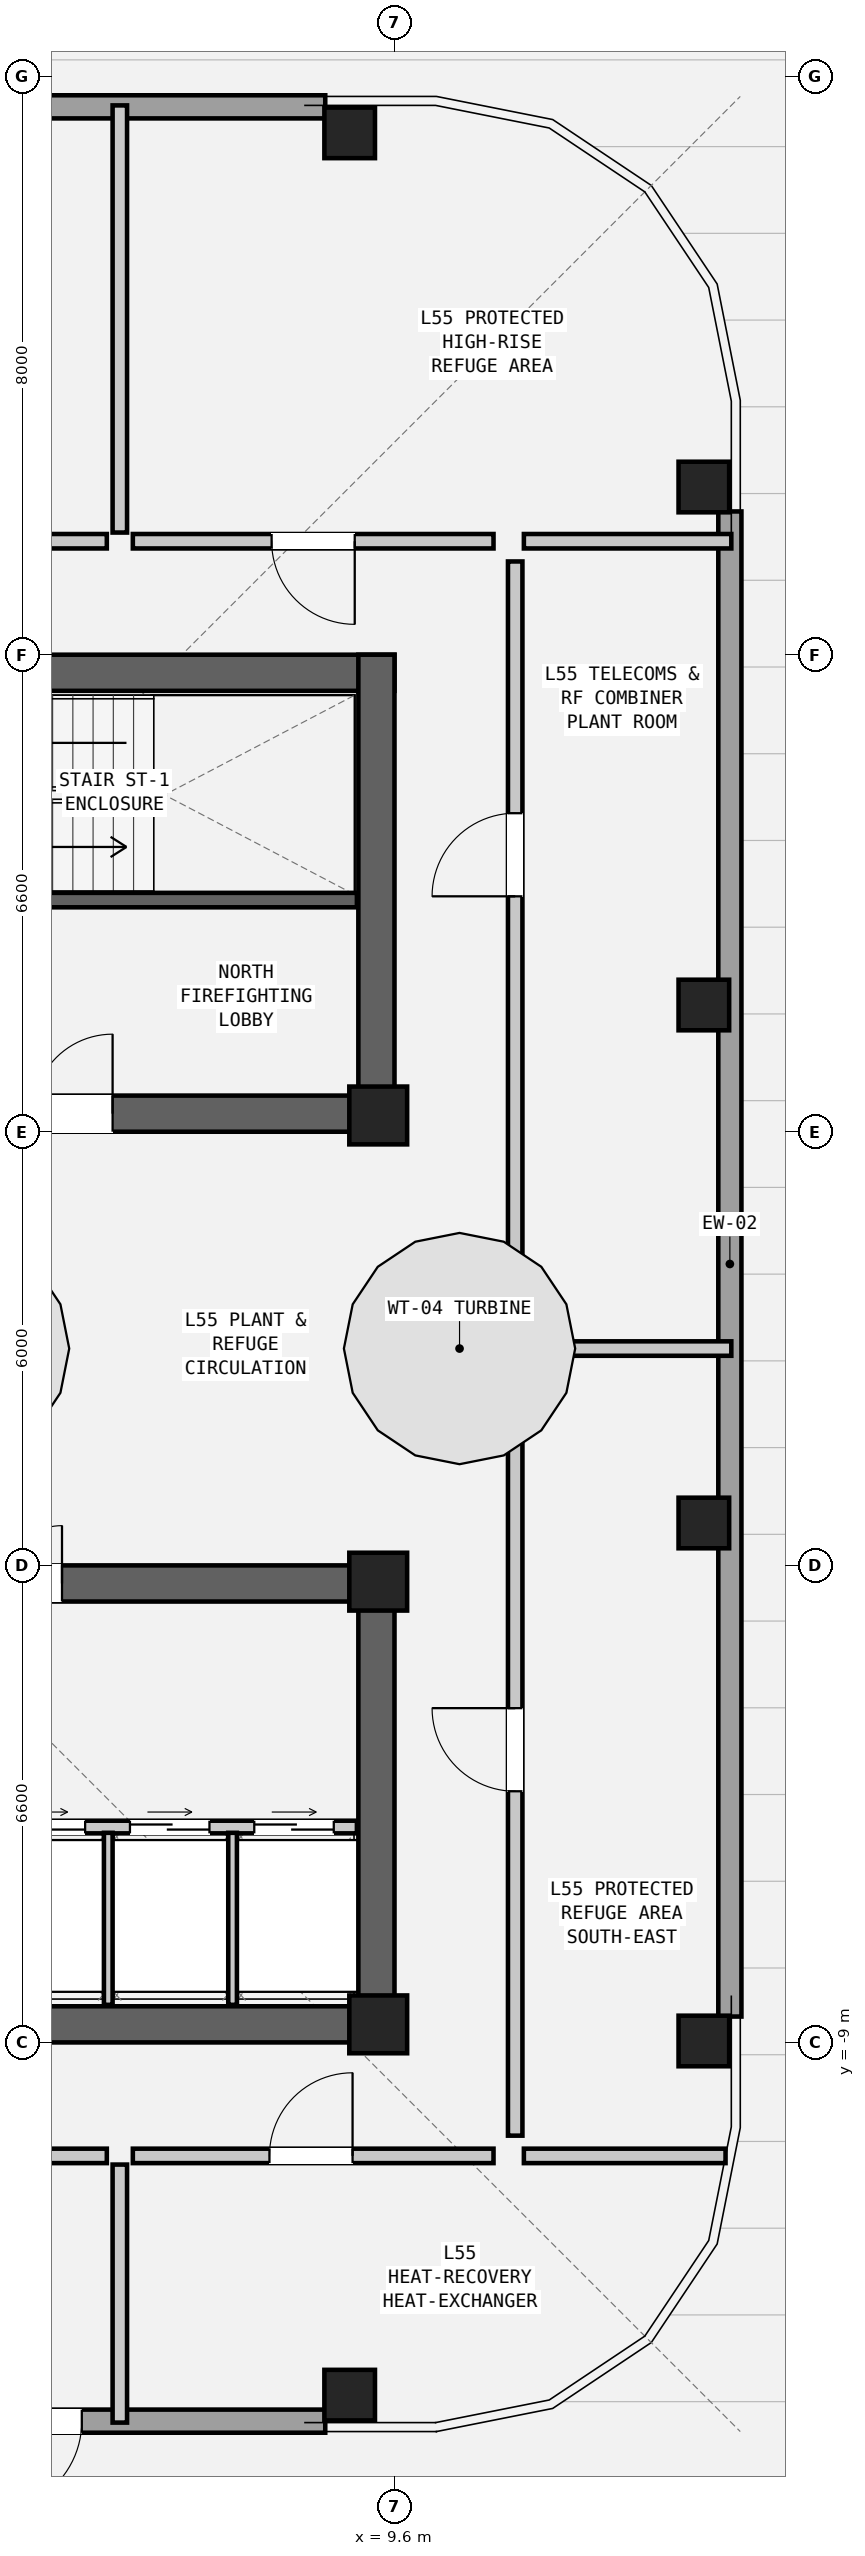
"""IFC4 building model, lengths in metres.
Left out: names, types, materials, properties, quantities, classifications, styles, units other than length and angle.
Written with IfcOpenShell. Run it as: python <this file> out.ifc"""

import sys

from ifc_helpers import new_model, si_unit, direction, frame, frame_2d, origin, origin_2d, place, context, subcontext, project, spatial, rectangle, hollow_rectangle, extrude, element, fill, save


model = new_model("IFC4")
c1 = context("Model", 3, precision=1e-05, world=origin(), true_north=direction((0.0, 1.0)))
c2 = subcontext(c1, "Body", "Model", "MODEL_VIEW")
j1 = project(units=[si_unit("LENGTHUNIT", "METRE"), si_unit("PLANEANGLEUNIT", "RADIAN")], contexts=[c1])
p1 = place(None, origin())
s1 = spatial("IfcSite", under=j1, at=p1, CompositionType="ELEMENT")
p2 = place(p1, origin())
s2 = spatial("IfcBuilding", under=s1, at=p2, CompositionType="ELEMENT")
p3 = place(p2, frame((0.0, 0.0, 187.95)))
s3 = spatial("IfcBuildingStorey", under=s2, at=p3, CompositionType="ELEMENT", Elevation=187.95)
p4 = place(p3, frame((-9.6, 9.95, 0.0), z_axis=(0.0, 0.0, 1.0), x_axis=(1.0, 0.0, 0.0)))
e1 = element("IfcWall", 1, at=p4, inside=s3, PredefinedType="SHEAR", context=c2, shape_type="SweptSolid", body=[
    extrude(rectangle(XDim=19.2, YDim=0.5, at=frame_2d((9.6, 0.0))), origin(), (0.0, 0.0, 1.0), 3.6),
])
p5 = place(p3, frame((-9.6, 3.85, 0.0), z_axis=(0.0, 0.0, 1.0), x_axis=(1.0, 0.0, 0.0)))
e2 = element("IfcWall", 2, at=p5, inside=s3, PredefinedType="SHEAR", context=c2, shape_type="SweptSolid", body=[
    extrude(rectangle(XDim=19.2, YDim=0.5, at=frame_2d((9.6, 0.0))), origin(), (0.0, 0.0, 1.0), 3.6),
])
p6 = place(p5, frame((14.2, 0.0, 0.0)))
e3 = element("IfcOpeningElement", 3, at=p6, cuts=e2, PredefinedType="OPENING", context=c2, shape_type="SweptSolid", body=[
    extrude(rectangle(XDim=1.1, YDim=2.08, at=frame_2d((0.55, 1.04))), frame((0.0, 0.262, 0.0), z_axis=(0.0, -1.0, 0.0), x_axis=(1.0, 0.0, 0.0)), (0.0, 0.0, 1.0), 0.524),
])
p7 = place(p5, frame((8.2, 0.0, 0.0)))
e4 = element("IfcOpeningElement", 4, at=p7, cuts=e2, PredefinedType="OPENING", context=c2, shape_type="SweptSolid", body=[
    extrude(rectangle(XDim=1.15, YDim=2.1, at=frame_2d((0.575, 1.05))), frame((0.0, 0.262, 0.0), z_axis=(0.0, -1.0, 0.0), x_axis=(1.0, 0.0, 0.0)), (0.0, 0.0, 1.0), 0.524),
])
p8 = place(p5, frame((2.5, 0.0, 0.0)))
e5 = element("IfcOpeningElement", 5, at=p8, cuts=e2, PredefinedType="OPENING", context=c2, shape_type="SweptSolid", body=[
    extrude(rectangle(XDim=1.2, YDim=2.1, at=frame_2d((0.6, 1.05))), frame((0.0, 0.262, 0.0), z_axis=(0.0, -1.0, 0.0), x_axis=(1.0, 0.0, 0.0)), (0.0, 0.0, 1.0), 0.524),
])
p9 = place(p3, frame((9.35, 3.6, 0.0), z_axis=(0.0, 0.0, 1.0), x_axis=(0.0, 1.0, 0.0)))
e6 = element("IfcWall", 6, at=p9, inside=s3, PredefinedType="SHEAR", context=c2, shape_type="SweptSolid", body=[
    extrude(rectangle(XDim=6.6, YDim=0.5, at=frame_2d((3.3, 0.0))), origin(), (0.0, 0.0, 1.0), 3.6),
])
p10 = place(p3, frame((-9.6, -8.75, 0.0), z_axis=(0.0, 0.0, 1.0), x_axis=(1.0, 0.0, 0.0)))
e7 = element("IfcWall", 7, at=p10, inside=s3, PredefinedType="SHEAR", context=c2, shape_type="SweptSolid", body=[
    extrude(rectangle(XDim=19.2, YDim=0.5, at=frame_2d((9.6, 0.0))), origin(), (0.0, 0.0, 1.0), 3.6),
])
p11 = place(p3, frame((-9.6, -2.65, 0.0), z_axis=(0.0, 0.0, 1.0), x_axis=(1.0, 0.0, 0.0)))
e8 = element("IfcWall", 8, at=p11, inside=s3, PredefinedType="SHEAR", context=c2, shape_type="SweptSolid", body=[
    extrude(rectangle(XDim=19.2, YDim=0.5, at=frame_2d((9.6, 0.0))), origin(), (0.0, 0.0, 1.0), 3.6),
])
p12 = place(p11, frame((3.8, 0.0, 0.0)))
e9 = element("IfcOpeningElement", 9, at=p12, cuts=e8, PredefinedType="OPENING", context=c2, shape_type="SweptSolid", body=[
    extrude(rectangle(XDim=1.1, YDim=2.08, at=frame_2d((0.55, 1.04))), frame((0.0, 0.262, 0.0), z_axis=(0.0, -1.0, 0.0), x_axis=(1.0, 0.0, 0.0)), (0.0, 0.0, 1.0), 0.524),
])
p13 = place(p11, frame((13.0, 0.0, 0.0)))
e10 = element("IfcOpeningElement", 10, at=p13, cuts=e8, PredefinedType="OPENING", context=c2, shape_type="SweptSolid", body=[
    extrude(rectangle(XDim=1.6, YDim=2.12, at=frame_2d((0.8, 1.06))), frame((0.0, 0.262, 0.0), z_axis=(0.0, -1.0, 0.0), x_axis=(1.0, 0.0, 0.0)), (0.0, 0.0, 1.0), 0.524),
])
p14 = place(p3, frame((9.35, -9.0, 0.0), z_axis=(0.0, 0.0, 1.0), x_axis=(0.0, 1.0, 0.0)))
e11 = element("IfcWall", 11, at=p14, inside=s3, PredefinedType="SHEAR", context=c2, shape_type="SweptSolid", body=[
    extrude(rectangle(XDim=6.6, YDim=0.5, at=frame_2d((3.3, 0.0))), origin(), (0.0, 0.0, 1.0), 3.6),
])
for number, where, z_axis, x_axis in (
    (12, (8.98, -13.88, 0.0), (0.0, 0.0, 1.0), (1.0, 0.0, 0.0)),
    (13, (13.88, -8.98, 0.0), (0.0, 0.0, 1.0), (0.0, 1.0, 0.0)),
    (14, (13.88, -1.813, 0.0), (0.0, 0.0, 1.0), (0.0, 1.0, 0.0)),
    (15, (13.88, 5.353, 0.0), (0.0, 0.0, 1.0), (0.0, 1.0, 0.0)),
    (16, (13.88, 12.52, 0.0), (0.0, 0.0, 1.0), (0.0, 1.0, 0.0)),
    (17, (8.98, 17.42, 0.0), (0.0, 0.0, 1.0), (1.0, 0.0, 0.0)),
):
    element("IfcColumn", number, at=place(p3, frame(where, z_axis=z_axis, x_axis=x_axis)), inside=s3, PredefinedType="COLUMN", context=c2, shape_type="SweptSolid", body=[
        extrude(hollow_rectangle(XDim=0.7, YDim=0.7, WallThickness=0.045, at=origin_2d()), origin(), (0.0, 0.0, 1.0), 3.6),
    ])
for number, where, z_axis, x_axis in (
    (18, (9.375, 3.825, 0.0), (0.0, 0.0, 1.0), (1.0, 0.0, 0.0)),
    (19, (9.375, -2.625, 0.0), (0.0, 0.0, 1.0), (1.0, 0.0, 0.0)),
    (20, (9.375, -8.75, 0.0), (0.0, 0.0, 1.0), (1.0, 0.0, 0.0)),
):
    element("IfcColumn", number, at=place(p3, frame(where, z_axis=z_axis, x_axis=x_axis)), inside=s3, PredefinedType="COLUMN", context=c2, shape_type="SweptSolid", body=[
        extrude(rectangle(XDim=0.8, YDim=0.8, at=origin_2d()), origin(), (0.0, 0.0, 1.0), 3.6),
    ])
p15 = place(p3, frame((8.642, -14.24, 0.0), z_axis=(0.0, 0.0, 1.0), x_axis=(-1.0, 0.0, 0.0)))
e21 = element("IfcWall", 21, at=p15, inside=s3, PredefinedType="SOLIDWALL", context=c2, shape_type="SweptSolid", body=[
    extrude(rectangle(XDim=20.824, YDim=0.32, at=frame_2d((10.412, 0.0))), origin(), (0.0, 0.0, 1.0), 2.182),
])
p16 = place(p15, frame((3.368, 0.0, 0.0)))
e22 = element("IfcOpeningElement", 22, at=p16, cuts=e21, PredefinedType="OPENING", context=c2, shape_type="SweptSolid", body=[
    extrude(rectangle(XDim=1.25, YDim=2.02, at=frame_2d((0.625, 1.01))), frame((0.0, 0.172, 0.0), z_axis=(0.0, -1.0, 0.0), x_axis=(1.0, 0.0, 0.0)), (0.0, 0.0, 1.0), 0.344),
])
for number, where, z_axis, x_axis in (
    (23, (14.24, 12.182, 0.0), (0.0, 0.0, 1.0), (0.0, -1.0, 0.0)),
    (24, (-12.182, 17.78, 0.0), (0.0, 0.0, 1.0), (1.0, 0.0, 0.0)),
):
    element("IfcWall", number, at=place(p3, frame(where, z_axis=z_axis, x_axis=x_axis)), inside=s3, PredefinedType="SOLIDWALL", context=c2, shape_type="SweptSolid", body=[
        extrude(rectangle(XDim=20.824, YDim=0.32, at=frame_2d((10.412, 0.0))), origin(), (0.0, 0.0, 1.0), 2.182),
    ])
p17 = place(p3, frame((2.36, 6.805, 0.0), z_axis=(0.0, 0.0, 1.0), x_axis=(1.0, 0.0, 0.0)))
e25 = element("IfcWall", 25, at=p17, inside=s3, PredefinedType="SHEAR", context=c2, shape_type="SweptSolid", body=[
    extrude(rectangle(XDim=6.72, YDim=0.2, at=frame_2d((3.36, 0.0))), origin(), (0.0, 0.0, 1.0), 3.32),
])
p18 = place(p17, frame((0.3, 0.0, 0.0)))
e26 = element("IfcOpeningElement", 26, at=p18, cuts=e25, PredefinedType="OPENING", context=c2, shape_type="SweptSolid", body=[
    extrude(rectangle(XDim=1.05, YDim=2.08, at=frame_2d((0.525, 1.04))), frame((0.0, 0.112, 0.0), z_axis=(0.0, -1.0, 0.0), x_axis=(1.0, 0.0, 0.0)), (0.0, 0.0, 1.0), 0.224),
])
p19 = place(p3, frame((0.0, -6.02, 0.0), z_axis=(0.0, 0.0, 1.0), x_axis=(1.0, 0.0, 0.0)))
e27 = element("IfcWall", 27, at=p19, inside=s3, PredefinedType="PARTITIONING", context=c2, shape_type="SweptSolid", body=[
    extrude(rectangle(XDim=9.08, YDim=0.175, at=frame_2d((4.54, 0.0))), origin(), (0.0, 0.0, 1.0), 3.32),
])
p20 = place(p19, frame((4.22, 0.0, 0.0)))
e28 = element("IfcOpeningElement", 28, at=p20, cuts=e27, PredefinedType="OPENING", context=c2, shape_type="SweptSolid", body=[
    extrude(rectangle(XDim=1.1, YDim=2.06, at=frame_2d((0.55, 1.03))), frame((0.0, 0.1, 0.0), z_axis=(0.0, -1.0, 0.0), x_axis=(1.0, 0.0, 0.0)), (0.0, 0.0, 1.0), 0.199),
])
p21 = place(p19, frame((5.94, 0.0, 0.0)))
e29 = element("IfcOpeningElement", 29, at=p21, cuts=e27, PredefinedType="OPENING", context=c2, shape_type="SweptSolid", body=[
    extrude(rectangle(XDim=1.1, YDim=2.06, at=frame_2d((0.55, 1.03))), frame((0.0, 0.1, 0.0), z_axis=(0.0, -1.0, 0.0), x_axis=(1.0, 0.0, 0.0)), (0.0, 0.0, 1.0), 0.199),
])
p22 = place(p19, frame((7.66, 0.0, 0.0)))
e30 = element("IfcOpeningElement", 30, at=p22, cuts=e27, PredefinedType="OPENING", context=c2, shape_type="SweptSolid", body=[
    extrude(rectangle(XDim=1.1, YDim=2.06, at=frame_2d((0.55, 1.03))), frame((0.0, 0.1, 0.0), z_axis=(0.0, -1.0, 0.0), x_axis=(1.0, 0.0, 0.0)), (0.0, 0.0, 1.0), 0.199),
])
for number, where, z_axis, x_axis in (
    (31, (5.64, -8.48, 0.0), (0.0, 0.0, 1.0), (0.0, 1.0, 0.0)),
    (32, (7.36, -8.48, 0.0), (0.0, 0.0, 1.0), (0.0, 1.0, 0.0)),
):
    element("IfcWall", number, at=place(p3, frame(where, z_axis=z_axis, x_axis=x_axis)), inside=s3, PredefinedType="PARTITIONING", context=c2, shape_type="SweptSolid", body=[
        extrude(rectangle(XDim=2.38, YDim=0.12, at=frame_2d((1.19, 0.0))), origin(), (0.0, 0.0, 1.0), 3.32),
    ])
p23 = place(p3, frame((5.62, 11.77, 0.0), z_axis=(0.0, 0.0, 1.0), x_axis=(-1.0, 0.0, 0.0)))
e33 = element("IfcWall", 33, at=p23, inside=s3, PredefinedType="PARTITIONING", context=c2, shape_type="SweptSolid", body=[
    extrude(rectangle(XDim=5.09, YDim=0.2, at=frame_2d((2.545, 0.0))), origin(), (0.0, 0.0, 1.0), 3.32),
])
p24 = place(p23, frame((1.97, 0.0, 0.0)))
e34 = element("IfcOpeningElement", 34, at=p24, cuts=e33, PredefinedType="OPENING", context=c2, shape_type="SweptSolid", body=[
    extrude(rectangle(XDim=1.15, YDim=2.1, at=frame_2d((0.575, 1.05))), frame((0.0, 0.112, 0.0), z_axis=(0.0, -1.0, 0.0), x_axis=(1.0, 0.0, 0.0)), (0.0, 0.0, 1.0), 0.224),
])
p25 = place(p3, frame((5.8, 11.89, 0.0), z_axis=(0.0, 0.0, 1.0), x_axis=(0.0, 1.0, 0.0)))
e35 = element("IfcWall", 35, at=p25, inside=s3, PredefinedType="PARTITIONING", context=c2, shape_type="SweptSolid", body=[
    extrude(rectangle(XDim=5.91, YDim=0.2, at=frame_2d((2.955, 0.0))), origin(), (0.0, 0.0, 1.0), 2.538),
])
p26 = place(p3, frame((10.97, 11.77, 0.0), z_axis=(0.0, 0.0, 1.0), x_axis=(-1.0, 0.0, 0.0)))
e36 = element("IfcWall", 36, at=p26, inside=s3, PredefinedType="PARTITIONING", context=c2, shape_type="SweptSolid", body=[
    extrude(rectangle(XDim=4.99, YDim=0.2, at=frame_2d((2.495, 0.0))), origin(), (0.0, 0.0, 1.0), 3.32),
])
p27 = place(p26, frame((1.92, 0.0, 0.0)))
e37 = element("IfcOpeningElement", 37, at=p27, cuts=e36, PredefinedType="OPENING", context=c2, shape_type="SweptSolid", body=[
    extrude(rectangle(XDim=1.15, YDim=2.1, at=frame_2d((0.575, 1.05))), frame((0.0, 0.112, 0.0), z_axis=(0.0, -1.0, 0.0), x_axis=(1.0, 0.0, 0.0)), (0.0, 0.0, 1.0), 0.224),
])
p28 = place(p3, frame((0.53, -10.57, 0.0), z_axis=(0.0, 0.0, 1.0), x_axis=(1.0, 0.0, 0.0)))
e38 = element("IfcWall", 38, at=p28, inside=s3, PredefinedType="PARTITIONING", context=c2, shape_type="SweptSolid", body=[
    extrude(rectangle(XDim=5.09, YDim=0.2, at=frame_2d((2.545, 0.0))), origin(), (0.0, 0.0, 1.0), 3.32),
])
p29 = place(p28, frame((1.97, 0.0, 0.0)))
e39 = element("IfcOpeningElement", 39, at=p29, cuts=e38, PredefinedType="OPENING", context=c2, shape_type="SweptSolid", body=[
    extrude(rectangle(XDim=1.15, YDim=2.1, at=frame_2d((0.575, 1.05))), frame((0.0, 0.112, 0.0), z_axis=(0.0, -1.0, 0.0), x_axis=(1.0, 0.0, 0.0)), (0.0, 0.0, 1.0), 0.224),
])
p30 = place(p3, frame((5.8, -14.26, 0.0), z_axis=(0.0, 0.0, 1.0), x_axis=(0.0, 1.0, 0.0)))
e40 = element("IfcWall", 40, at=p30, inside=s3, PredefinedType="PARTITIONING", context=c2, shape_type="SweptSolid", body=[
    extrude(rectangle(XDim=3.57, YDim=0.2, at=frame_2d((1.785, 0.0))), origin(), (0.0, 0.0, 1.0), 2.538),
])
p31 = place(p3, frame((5.98, -10.57, 0.0), z_axis=(0.0, 0.0, 1.0), x_axis=(1.0, 0.0, 0.0)))
e41 = element("IfcWall", 41, at=p31, inside=s3, PredefinedType="PARTITIONING", context=c2, shape_type="SweptSolid", body=[
    extrude(rectangle(XDim=4.99, YDim=0.2, at=frame_2d((2.495, 0.0))), origin(), (0.0, 0.0, 1.0), 3.32),
])
p32 = place(p31, frame((1.89, 0.0, 0.0)))
e42 = element("IfcOpeningElement", 42, at=p32, cuts=e41, PredefinedType="OPENING", context=c2, shape_type="SweptSolid", body=[
    extrude(rectangle(XDim=1.15, YDim=2.1, at=frame_2d((0.575, 1.05))), frame((0.0, 0.112, 0.0), z_axis=(0.0, -1.0, 0.0), x_axis=(1.0, 0.0, 0.0)), (0.0, 0.0, 1.0), 0.224),
])
p33 = place(p3, frame((11.39, 11.77, 0.0), z_axis=(0.0, 0.0, 1.0), x_axis=(1.0, 0.0, 0.0)))
e43 = element("IfcWall", 43, at=p33, inside=s3, PredefinedType="PARTITIONING", context=c2, shape_type="SweptSolid", body=[
    extrude(rectangle(XDim=2.87, YDim=0.2, at=frame_2d((1.435, 0.0))), origin(), (0.0, 0.0, 1.0), 3.32),
])
p34 = place(p3, frame((11.39, -10.57, 0.0), z_axis=(0.0, 0.0, 1.0), x_axis=(1.0, 0.0, 0.0)))
e44 = element("IfcWall", 44, at=p34, inside=s3, PredefinedType="PARTITIONING", context=c2, shape_type="SweptSolid", body=[
    extrude(rectangle(XDim=2.79, YDim=0.2, at=frame_2d((1.395, 0.0))), origin(), (0.0, 0.0, 1.0), 3.32),
])
p35 = place(p3, frame((11.39, 0.6, 0.0), z_axis=(0.0, 0.0, 1.0), x_axis=(1.0, 0.0, 0.0)))
e45 = element("IfcWall", 45, at=p35, inside=s3, PredefinedType="PARTITIONING", context=c2, shape_type="SweptSolid", body=[
    extrude(rectangle(XDim=2.87, YDim=0.2, at=frame_2d((1.435, 0.0))), origin(), (0.0, 0.0, 1.0), 2.538),
])
p36 = place(p3, frame((11.27, -10.29, 0.0), z_axis=(0.0, 0.0, 1.0), x_axis=(0.0, 1.0, 0.0)))
e46 = element("IfcWall", 46, at=p36, inside=s3, PredefinedType="PARTITIONING", context=c2, shape_type="SweptSolid", body=[
    extrude(rectangle(XDim=10.68, YDim=0.2, at=frame_2d((5.34, 0.0))), origin(), (0.0, 0.0, 1.0), 3.32),
])
p37 = place(p36, frame((4.765, 0.0, 0.0)))
e47 = element("IfcOpeningElement", 47, at=p37, cuts=e46, PredefinedType="OPENING", context=c2, shape_type="SweptSolid", body=[
    extrude(rectangle(XDim=1.15, YDim=2.1, at=frame_2d((0.575, 1.05))), frame((0.0, 0.112, 0.0), z_axis=(0.0, -1.0, 0.0), x_axis=(1.0, 0.0, 0.0)), (0.0, 0.0, 1.0), 0.224),
])
p38 = place(p3, frame((11.27, 0.81, 0.0), z_axis=(0.0, 0.0, 1.0), x_axis=(0.0, 1.0, 0.0)))
e48 = element("IfcWall", 48, at=p38, inside=s3, PredefinedType="PARTITIONING", context=c2, shape_type="SweptSolid", body=[
    extrude(rectangle(XDim=10.68, YDim=0.2, at=frame_2d((5.34, 0.0))), origin(), (0.0, 0.0, 1.0), 3.32),
])
p39 = place(p38, frame((6.047, 0.0, 0.0)))
e49 = element("IfcOpeningElement", 49, at=p39, cuts=e48, PredefinedType="OPENING", context=c2, shape_type="SweptSolid", body=[
    extrude(rectangle(XDim=1.15, YDim=2.1, at=frame_2d((0.575, 1.05))), frame((0.0, 0.112, 0.0), z_axis=(0.0, -1.0, 0.0), x_axis=(1.0, 0.0, 0.0)), (0.0, 0.0, 1.0), 0.224),
])
p40 = place(p16, origin())
e50 = element("IfcDoor", 50, at=p40, inside=s3, OperationType="SINGLE_SWING_RIGHT", PredefinedType="DOOR", context=c2, shape_type="SweptSolid", body=[
    extrude(rectangle(XDim=1.25, YDim=2.02, at=frame_2d((0.625, 1.01))), frame((0.0, 0.025, 0.0), z_axis=(0.0, -1.0, 0.0), x_axis=(1.0, 0.0, 0.0)), (0.0, 0.0, 1.0), 0.05),
])
fill(e22, e50)
p41 = place(p6, origin())
e51 = element("IfcDoor", 51, at=p41, inside=s3, OperationType="SINGLE_SWING_RIGHT", PredefinedType="DOOR", context=c2, shape_type="SweptSolid", body=[
    extrude(rectangle(XDim=1.1, YDim=2.08, at=frame_2d((0.55, 1.04))), frame((0.0, 0.025, 0.0), z_axis=(0.0, -1.0, 0.0), x_axis=(1.0, 0.0, 0.0)), (0.0, 0.0, 1.0), 0.05),
])
fill(e3, e51)
p42 = place(p13, origin())
e52 = element("IfcDoor", 52, at=p42, inside=s3, OperationType="DOUBLE_DOOR_SINGLE_SWING", PredefinedType="DOOR", context=c2, shape_type="SweptSolid", body=[
    extrude(rectangle(XDim=1.6, YDim=2.12, at=frame_2d((0.8, 1.06))), frame((0.0, 0.025, 0.0), z_axis=(0.0, -1.0, 0.0), x_axis=(1.0, 0.0, 0.0)), (0.0, 0.0, 1.0), 0.05),
])
fill(e10, e52)
p43 = place(p27, origin())
e53 = element("IfcDoor", 53, at=p43, inside=s3, OperationType="SINGLE_SWING_LEFT", PredefinedType="DOOR", context=c2, shape_type="SweptSolid", body=[
    extrude(rectangle(XDim=1.15, YDim=2.1, at=frame_2d((0.575, 1.05))), frame((0.0, 0.025, 0.0), z_axis=(0.0, -1.0, 0.0), x_axis=(1.0, 0.0, 0.0)), (0.0, 0.0, 1.0), 0.05),
])
fill(e37, e53)
p44 = place(p32, origin())
e54 = element("IfcDoor", 54, at=p44, inside=s3, OperationType="SINGLE_SWING_RIGHT", PredefinedType="DOOR", context=c2, shape_type="SweptSolid", body=[
    extrude(rectangle(XDim=1.15, YDim=2.1, at=frame_2d((0.575, 1.05))), frame((0.0, 0.025, 0.0), z_axis=(0.0, -1.0, 0.0), x_axis=(1.0, 0.0, 0.0)), (0.0, 0.0, 1.0), 0.05),
])
fill(e42, e54)
p45 = place(p37, origin())
e55 = element("IfcDoor", 55, at=p45, inside=s3, OperationType="SINGLE_SWING_RIGHT", PredefinedType="DOOR", context=c2, shape_type="SweptSolid", body=[
    extrude(rectangle(XDim=1.15, YDim=2.1, at=frame_2d((0.575, 1.05))), frame((0.0, 0.025, 0.0), z_axis=(0.0, -1.0, 0.0), x_axis=(1.0, 0.0, 0.0)), (0.0, 0.0, 1.0), 0.05),
])
fill(e47, e55)
p46 = place(p39, origin())
e56 = element("IfcDoor", 56, at=p46, inside=s3, OperationType="SINGLE_SWING_LEFT", PredefinedType="DOOR", context=c2, shape_type="SweptSolid", body=[
    extrude(rectangle(XDim=1.15, YDim=2.1, at=frame_2d((0.575, 1.05))), frame((0.0, 0.025, 0.0), z_axis=(0.0, -1.0, 0.0), x_axis=(1.0, 0.0, 0.0)), (0.0, 0.0, 1.0), 0.05),
])
fill(e49, e56)
p47 = place(p20, origin())
e57 = element("IfcDoor", 57, at=p47, inside=s3, OperationType="DOUBLE_DOOR_SLIDING", PredefinedType="DOOR", context=c2, shape_type="SweptSolid", body=[
    extrude(rectangle(XDim=1.1, YDim=2.06, at=frame_2d((0.55, 1.03))), frame((0.0, 0.025, 0.0), z_axis=(0.0, -1.0, 0.0), x_axis=(1.0, 0.0, 0.0)), (0.0, 0.0, 1.0), 0.05),
])
fill(e28, e57)
p48 = place(p21, origin())
e58 = element("IfcDoor", 58, at=p48, inside=s3, OperationType="DOUBLE_DOOR_SLIDING", PredefinedType="DOOR", context=c2, shape_type="SweptSolid", body=[
    extrude(rectangle(XDim=1.1, YDim=2.06, at=frame_2d((0.55, 1.03))), frame((0.0, 0.025, 0.0), z_axis=(0.0, -1.0, 0.0), x_axis=(1.0, 0.0, 0.0)), (0.0, 0.0, 1.0), 0.05),
])
fill(e29, e58)
p49 = place(p22, origin())
e59 = element("IfcDoor", 59, at=p49, inside=s3, OperationType="DOUBLE_DOOR_SLIDING", PredefinedType="DOOR", context=c2, shape_type="SweptSolid", body=[
    extrude(rectangle(XDim=1.1, YDim=2.06, at=frame_2d((0.55, 1.03))), frame((0.0, 0.025, 0.0), z_axis=(0.0, -1.0, 0.0), x_axis=(1.0, 0.0, 0.0)), (0.0, 0.0, 1.0), 0.05),
])
fill(e30, e59)
save(model, sys.argv[1])
